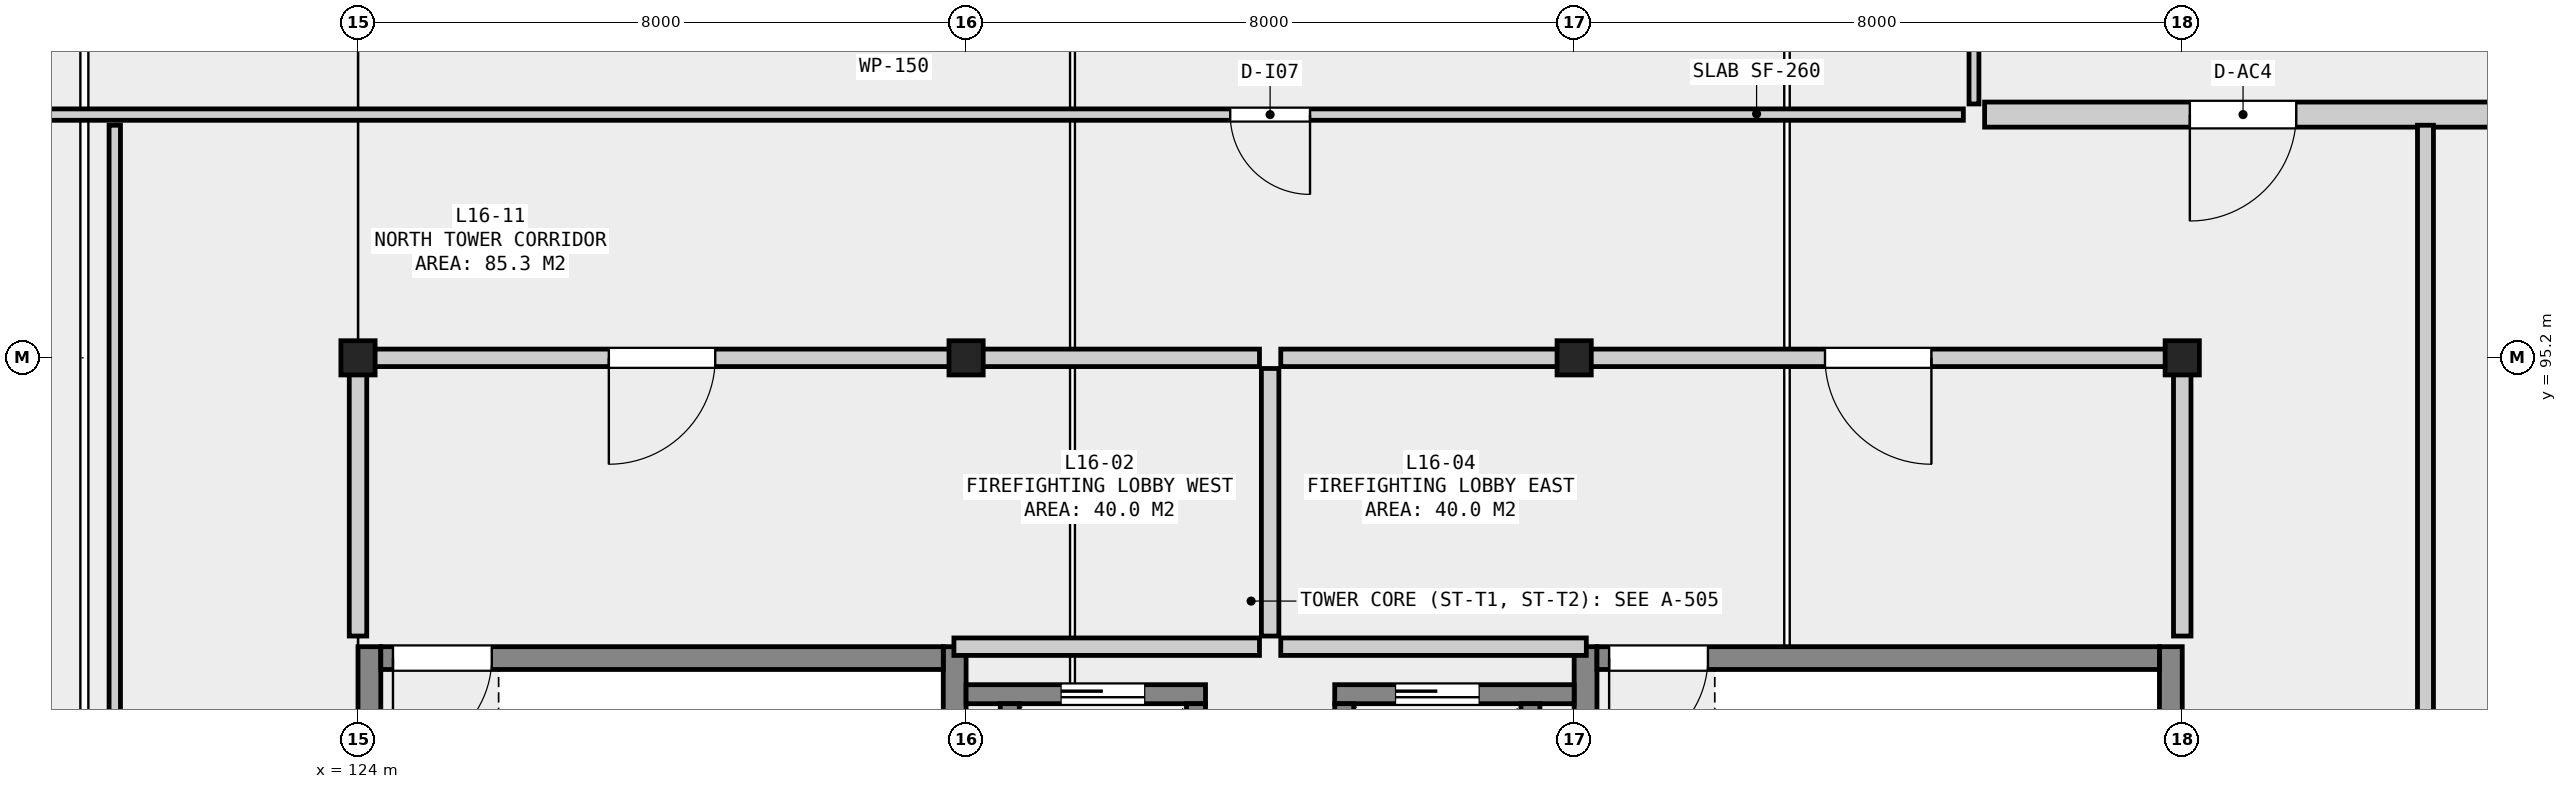
"""IFC4 building model, lengths in metres.
Left out: names, types, materials, properties, quantities, classifications, styles, units other than length and angle.
Written with IfcOpenShell. Run it as: python <this file> out.ifc"""

import sys

from ifc_helpers import new_model, si_unit, direction, frame, frame_2d, origin, origin_2d, place, context, subcontext, project, spatial, rectangle, extrude, element, fill, save


model = new_model("IFC4")
c1 = context("Model", 3, precision=1e-05, world=origin(), true_north=direction((0.0, 1.0)))
c2 = subcontext(c1, "Body", "Model", "MODEL_VIEW")
j1 = project(units=[si_unit("LENGTHUNIT", "METRE"), si_unit("PLANEANGLEUNIT", "RADIAN")], contexts=[c1])
p1 = place(None, origin())
s1 = spatial("IfcSite", under=j1, at=p1, CompositionType="ELEMENT")
p2 = place(p1, origin())
s2 = spatial("IfcBuilding", under=s1, at=p2, CompositionType="ELEMENT")
p3 = place(p2, frame((0.0, 0.0, 66.6)))
s3 = spatial("IfcBuildingStorey", under=s2, at=p3, CompositionType="ELEMENT", Elevation=66.6)
for number, where, z_axis, x_axis in (
    (1, (124.0, 95.2, 0.0), (0.0, 0.0, 1.0), (1.0, 0.0, 0.0)),
    (2, (132.0, 95.2, 0.0), (0.0, 0.0, 1.0), (1.0, 0.0, 0.0)),
    (3, (140.0, 95.2, 0.0), (0.0, 0.0, 1.0), (1.0, 0.0, 0.0)),
    (4, (148.0, 95.2, 0.0), (0.0, 0.0, 1.0), (1.0, 0.0, 0.0)),
):
    element("IfcColumn", number, at=place(p3, frame(where, z_axis=z_axis, x_axis=x_axis)), inside=s3, PredefinedType="COLUMN", context=c2, shape_type="SweptSolid", body=[
        extrude(rectangle(XDim=0.45, YDim=0.45, at=origin_2d()), origin(), (0.0, 0.0, 1.0), 4.5),
    ])
for number, where, z_axis, x_axis in (
    (5, (124.15, 87.2, 0.0), (0.0, 0.0, 1.0), (0.0, 1.0, 0.0)),
    (6, (131.85, 87.2, 0.0), (0.0, 0.0, 1.0), (0.0, 1.0, 0.0)),
):
    element("IfcWall", number, at=place(p3, frame(where, z_axis=z_axis, x_axis=x_axis)), inside=s3, PredefinedType="SHEAR", context=c2, shape_type="SweptSolid", body=[
        extrude(rectangle(XDim=4.2, YDim=0.3, at=frame_2d((2.1, 0.0))), origin(), (0.0, 0.0, 1.0), 3.55),
    ])
p4 = place(p3, frame((124.3, 91.25, 0.0), z_axis=(0.0, 0.0, 1.0), x_axis=(1.0, 0.0, 0.0)))
e7 = element("IfcWall", 7, at=p4, inside=s3, PredefinedType="SHEAR", context=c2, shape_type="SweptSolid", body=[
    extrude(rectangle(XDim=7.4, YDim=0.3, at=frame_2d((3.7, 0.0))), origin(), (0.0, 0.0, 1.0), 3.55),
])
p5 = place(p4, frame((0.16, 0.0, 0.0)))
e8 = element("IfcOpeningElement", 8, at=p5, cuts=e7, PredefinedType="OPENING", context=c2, shape_type="SweptSolid", body=[
    extrude(rectangle(XDim=1.3, YDim=2.18, at=frame_2d((0.65, 1.09))), frame((0.0, 0.162, 0.0), z_axis=(0.0, -1.0, 0.0), x_axis=(1.0, 0.0, 0.0)), (0.0, 0.0, 1.0), 0.324),
])
for number, where, z_axis, x_axis in (
    (9, (140.15, 87.2, 0.0), (0.0, 0.0, 1.0), (0.0, 1.0, 0.0)),
    (10, (147.85, 87.2, 0.0), (0.0, 0.0, 1.0), (0.0, 1.0, 0.0)),
):
    element("IfcWall", number, at=place(p3, frame(where, z_axis=z_axis, x_axis=x_axis)), inside=s3, PredefinedType="SHEAR", context=c2, shape_type="SweptSolid", body=[
        extrude(rectangle(XDim=4.2, YDim=0.3, at=frame_2d((2.1, 0.0))), origin(), (0.0, 0.0, 1.0), 3.55),
    ])
p6 = place(p3, frame((140.3, 91.25, 0.0), z_axis=(0.0, 0.0, 1.0), x_axis=(1.0, 0.0, 0.0)))
e11 = element("IfcWall", 11, at=p6, inside=s3, PredefinedType="SHEAR", context=c2, shape_type="SweptSolid", body=[
    extrude(rectangle(XDim=7.4, YDim=0.3, at=frame_2d((3.7, 0.0))), origin(), (0.0, 0.0, 1.0), 3.55),
])
p7 = place(p6, frame((0.16, 0.0, 0.0)))
e12 = element("IfcOpeningElement", 12, at=p7, cuts=e11, PredefinedType="OPENING", context=c2, shape_type="SweptSolid", body=[
    extrude(rectangle(XDim=1.3, YDim=2.18, at=frame_2d((0.65, 1.09))), frame((0.0, 0.162, 0.0), z_axis=(0.0, -1.0, 0.0), x_axis=(1.0, 0.0, 0.0)), (0.0, 0.0, 1.0), 0.324),
])
p8 = place(p3, frame((132.0, 90.775, 0.0), z_axis=(0.0, 0.0, 1.0), x_axis=(1.0, 0.0, 0.0)))
e13 = element("IfcWall", 13, at=p8, inside=s3, PredefinedType="SHEAR", context=c2, shape_type="SweptSolid", body=[
    extrude(rectangle(XDim=3.15, YDim=0.25, at=frame_2d((1.575, 0.0))), origin(), (0.0, 0.0, 1.0), 3.55),
])
p9 = place(p8, frame((1.25, 0.0, 0.0)))
e14 = element("IfcOpeningElement", 14, at=p9, cuts=e13, PredefinedType="OPENING", context=c2, shape_type="SweptSolid", body=[
    extrude(rectangle(XDim=1.1, YDim=2.15, at=frame_2d((0.55, 1.075))), frame((0.0, 0.137, 0.0), z_axis=(0.0, -1.0, 0.0), x_axis=(1.0, 0.0, 0.0)), (0.0, 0.0, 1.0), 0.274),
])
for number, where, z_axis, x_axis in (
    (15, (132.575, 87.75, 0.0), (0.0, 0.0, 1.0), (0.0, 1.0, 0.0)),
    (16, (135.025, 87.75, 0.0), (0.0, 0.0, 1.0), (0.0, 1.0, 0.0)),
):
    element("IfcWall", number, at=place(p3, frame(where, z_axis=z_axis, x_axis=x_axis)), inside=s3, PredefinedType="SHEAR", context=c2, shape_type="SweptSolid", body=[
        extrude(rectangle(XDim=2.9, YDim=0.25, at=frame_2d((1.45, 0.0))), origin(), (0.0, 0.0, 1.0), 3.55),
    ])
p10 = place(p3, frame((136.85, 90.775, 0.0), z_axis=(0.0, 0.0, 1.0), x_axis=(1.0, 0.0, 0.0)))
e17 = element("IfcWall", 17, at=p10, inside=s3, PredefinedType="SHEAR", context=c2, shape_type="SweptSolid", body=[
    extrude(rectangle(XDim=3.15, YDim=0.25, at=frame_2d((1.575, 0.0))), origin(), (0.0, 0.0, 1.0), 3.55),
])
p11 = place(p10, frame((0.8, 0.0, 0.0)))
e18 = element("IfcOpeningElement", 18, at=p11, cuts=e17, PredefinedType="OPENING", context=c2, shape_type="SweptSolid", body=[
    extrude(rectangle(XDim=1.1, YDim=2.15, at=frame_2d((0.55, 1.075))), frame((0.0, 0.137, 0.0), z_axis=(0.0, -1.0, 0.0), x_axis=(1.0, 0.0, 0.0)), (0.0, 0.0, 1.0), 0.274),
])
for number, where, z_axis, x_axis in (
    (19, (136.975, 87.75, 0.0), (0.0, 0.0, 1.0), (0.0, 1.0, 0.0)),
    (20, (139.425, 87.75, 0.0), (0.0, 0.0, 1.0), (0.0, 1.0, 0.0)),
):
    element("IfcWall", number, at=place(p3, frame(where, z_axis=z_axis, x_axis=x_axis)), inside=s3, PredefinedType="SHEAR", context=c2, shape_type="SweptSolid", body=[
        extrude(rectangle(XDim=2.9, YDim=0.25, at=frame_2d((1.45, 0.0))), origin(), (0.0, 0.0, 1.0), 3.55),
    ])
p12 = place(p3, frame((131.84, 91.4, 0.0), z_axis=(0.0, 0.0, 1.0), x_axis=(1.0, 0.0, 0.0)))
e21 = element("IfcWall", 21, at=p12, inside=s3, PredefinedType="SOLIDWALL", context=c2, shape_type="SweptSolid", body=[
    extrude(rectangle(XDim=4.02, YDim=0.23, at=frame_2d((2.01, 0.0))), origin(), (0.0, 0.0, 1.0), 3.55),
])
p13 = place(p3, frame((124.14, 95.2, 0.0), z_axis=(0.0, 0.0, 1.0), x_axis=(1.0, 0.0, 0.0)))
e22 = element("IfcWall", 22, at=p13, inside=s3, PredefinedType="SOLIDWALL", context=c2, shape_type="SweptSolid", body=[
    extrude(rectangle(XDim=11.72, YDim=0.23, at=frame_2d((5.86, 0.0))), origin(), (0.0, 0.0, 1.0), 3.55),
])
p14 = place(p13, frame((3.16, 0.0, 0.0)))
e23 = element("IfcOpeningElement", 23, at=p14, cuts=e22, PredefinedType="OPENING", context=c2, shape_type="SweptSolid", body=[
    extrude(rectangle(XDim=1.4, YDim=2.2, at=frame_2d((0.7, 1.1))), frame((0.0, 0.127, 0.0), z_axis=(0.0, -1.0, 0.0), x_axis=(1.0, 0.0, 0.0)), (0.0, 0.0, 1.0), 0.254),
])
for number, where, z_axis, x_axis in (
    (24, (124.0, 91.54, 0.0), (0.0, 0.0, 1.0), (0.0, 1.0, 0.0)),
    (25, (136.0, 91.54, 0.0), (0.0, 0.0, 1.0), (0.0, 1.0, 0.0)),
):
    element("IfcWall", number, at=place(p3, frame(where, z_axis=z_axis, x_axis=x_axis)), inside=s3, PredefinedType="SOLIDWALL", context=c2, shape_type="SweptSolid", body=[
        extrude(rectangle(XDim=3.52, YDim=0.23, at=frame_2d((1.76, 0.0))), origin(), (0.0, 0.0, 1.0), 3.55),
    ])
p15 = place(p3, frame((136.14, 91.4, 0.0), z_axis=(0.0, 0.0, 1.0), x_axis=(1.0, 0.0, 0.0)))
e26 = element("IfcWall", 26, at=p15, inside=s3, PredefinedType="SOLIDWALL", context=c2, shape_type="SweptSolid", body=[
    extrude(rectangle(XDim=4.02, YDim=0.23, at=frame_2d((2.01, 0.0))), origin(), (0.0, 0.0, 1.0), 3.55),
])
p16 = place(p3, frame((136.14, 95.2, 0.0), z_axis=(0.0, 0.0, 1.0), x_axis=(1.0, 0.0, 0.0)))
e27 = element("IfcWall", 27, at=p16, inside=s3, PredefinedType="SOLIDWALL", context=c2, shape_type="SweptSolid", body=[
    extrude(rectangle(XDim=11.72, YDim=0.23, at=frame_2d((5.86, 0.0))), origin(), (0.0, 0.0, 1.0), 3.55),
])
p17 = place(p16, frame((7.16, 0.0, 0.0)))
e28 = element("IfcOpeningElement", 28, at=p17, cuts=e27, PredefinedType="OPENING", context=c2, shape_type="SweptSolid", body=[
    extrude(rectangle(XDim=1.4, YDim=2.2, at=frame_2d((0.7, 1.1))), frame((0.0, 0.127, 0.0), z_axis=(0.0, -1.0, 0.0), x_axis=(1.0, 0.0, 0.0)), (0.0, 0.0, 1.0), 0.254),
])
p18 = place(p3, frame((148.0, 91.54, 0.0), z_axis=(0.0, 0.0, 1.0), x_axis=(0.0, 1.0, 0.0)))
e29 = element("IfcWall", 29, at=p18, inside=s3, PredefinedType="SOLIDWALL", context=c2, shape_type="SweptSolid", body=[
    extrude(rectangle(XDim=3.52, YDim=0.23, at=frame_2d((1.76, 0.0))), origin(), (0.0, 0.0, 1.0), 3.55),
])
p19 = place(p3, frame((116.985, 98.4, 0.0), z_axis=(0.0, 0.0, 1.0), x_axis=(1.0, 0.0, 0.0)))
e30 = element("IfcWall", 30, at=p19, inside=s3, PredefinedType="PARTITIONING", context=c2, shape_type="SweptSolid", body=[
    extrude(rectangle(XDim=28.135, YDim=0.15, at=frame_2d((14.067, 0.0))), origin(), (0.0, 0.0, 1.0), 3.55),
])
p20 = place(p19, frame((18.49, 0.0, 0.0)))
e31 = element("IfcOpeningElement", 31, at=p20, cuts=e30, PredefinedType="OPENING", context=c2, shape_type="SweptSolid", body=[
    extrude(rectangle(XDim=1.05, YDim=2.15, at=frame_2d((0.525, 1.075))), frame((0.0, 0.087, 0.0), z_axis=(0.0, -1.0, 0.0), x_axis=(1.0, 0.0, 0.0)), (0.0, 0.0, 1.0), 0.174),
])
p21 = place(p3, frame((145.26, 98.54, 0.0), z_axis=(0.0, 0.0, 1.0), x_axis=(0.0, 1.0, 0.0)))
e32 = element("IfcWall", 32, at=p21, inside=s3, PredefinedType="PARTITIONING", context=c2, shape_type="SweptSolid", body=[
    extrude(rectangle(XDim=10.17, YDim=0.13, at=frame_2d((5.085, 0.0))), origin(), (0.0, 0.0, 1.0), 3.55),
])
p22 = place(p3, frame((145.4, 98.4, 0.0), z_axis=(0.0, 0.0, 1.0), x_axis=(1.0, 0.0, 0.0)))
e33 = element("IfcWall", 33, at=p22, inside=s3, PredefinedType="SOLIDWALL", context=c2, shape_type="SweptSolid", body=[
    extrude(rectangle(XDim=22.51, YDim=0.33, at=frame_2d((11.255, 0.0))), origin(), (0.0, 0.0, 1.0), 3.55),
])
p23 = place(p22, frame((2.7, 0.0, 0.0)))
e34 = element("IfcOpeningElement", 34, at=p23, cuts=e33, PredefinedType="OPENING", context=c2, shape_type="SweptSolid", body=[
    extrude(rectangle(XDim=1.4, YDim=2.2, at=frame_2d((0.7, 1.1))), frame((0.0, 0.177, 0.0), z_axis=(0.0, -1.0, 0.0), x_axis=(1.0, 0.0, 0.0)), (0.0, 0.0, 1.0), 0.354),
])
p24 = place(p3, frame((151.2, 72.175, 0.0), z_axis=(0.0, 0.0, 1.0), x_axis=(0.0, 1.0, 0.0)))
e35 = element("IfcWall", 35, at=p24, inside=s3, PredefinedType="SOLIDWALL", context=c2, shape_type="SweptSolid", body=[
    extrude(rectangle(XDim=26.085, YDim=0.21, at=frame_2d((13.042, 0.0))), origin(), (0.0, 0.0, 1.0), 3.55),
])
p25 = place(p24, frame((14.325, 0.0, 0.0)))
e36 = element("IfcOpeningElement", 36, at=p25, cuts=e35, PredefinedType="OPENING", context=c2, shape_type="SweptSolid", body=[
    extrude(rectangle(XDim=1.4, YDim=2.2, at=frame_2d((0.7, 1.1))), frame((0.0, 0.117, 0.0), z_axis=(0.0, -1.0, 0.0), x_axis=(1.0, 0.0, 0.0)), (0.0, 0.0, 1.0), 0.234),
])
p26 = place(p3, frame((120.8, 76.14, 0.0), z_axis=(0.0, 0.0, 1.0), x_axis=(0.0, 1.0, 0.0)))
e37 = element("IfcWall", 37, at=p26, inside=s3, PredefinedType="PARTITIONING", context=c2, shape_type="SweptSolid", body=[
    extrude(rectangle(XDim=22.12, YDim=0.15, at=frame_2d((11.06, 0.0))), origin(), (0.0, 0.0, 1.0), 3.55),
])
p27 = place(p26, frame((10.535, 0.0, 0.0)))
e38 = element("IfcOpeningElement", 38, at=p27, cuts=e37, PredefinedType="OPENING", context=c2, shape_type="SweptSolid", body=[
    extrude(rectangle(XDim=1.05, YDim=2.15, at=frame_2d((0.525, 1.075))), frame((0.0, 0.087, 0.0), z_axis=(0.0, -1.0, 0.0), x_axis=(1.0, 0.0, 0.0)), (0.0, 0.0, 1.0), 0.174),
])
p28 = place(p5, frame((1.3, 0.0, 0.0), z_axis=(0.0, 0.0, 1.0), x_axis=(-1.0, 0.0, 0.0)))
e39 = element("IfcDoor", 39, at=p28, inside=s3, OperationType="SINGLE_SWING_RIGHT", PredefinedType="DOOR", context=c2, shape_type="SweptSolid", body=[
    extrude(rectangle(XDim=1.3, YDim=2.18, at=frame_2d((0.65, 1.09))), frame((0.0, 0.025, 0.0), z_axis=(0.0, -1.0, 0.0), x_axis=(1.0, 0.0, 0.0)), (0.0, 0.0, 1.0), 0.05),
])
fill(e8, e39)
p29 = place(p7, frame((1.3, 0.0, 0.0), z_axis=(0.0, 0.0, 1.0), x_axis=(-1.0, 0.0, 0.0)))
e40 = element("IfcDoor", 40, at=p29, inside=s3, OperationType="SINGLE_SWING_RIGHT", PredefinedType="DOOR", context=c2, shape_type="SweptSolid", body=[
    extrude(rectangle(XDim=1.3, YDim=2.18, at=frame_2d((0.65, 1.09))), frame((0.0, 0.025, 0.0), z_axis=(0.0, -1.0, 0.0), x_axis=(1.0, 0.0, 0.0)), (0.0, 0.0, 1.0), 0.05),
])
fill(e12, e40)
p30 = place(p9, origin())
e41 = element("IfcDoor", 41, at=p30, inside=s3, OperationType="SLIDING_TO_LEFT", PredefinedType="DOOR", context=c2, shape_type="SweptSolid", body=[
    extrude(rectangle(XDim=1.1, YDim=2.15, at=frame_2d((0.55, 1.075))), frame((0.0, 0.025, 0.0), z_axis=(0.0, -1.0, 0.0), x_axis=(1.0, 0.0, 0.0)), (0.0, 0.0, 1.0), 0.05),
])
fill(e14, e41)
p31 = place(p11, origin())
e42 = element("IfcDoor", 42, at=p31, inside=s3, OperationType="SLIDING_TO_LEFT", PredefinedType="DOOR", context=c2, shape_type="SweptSolid", body=[
    extrude(rectangle(XDim=1.1, YDim=2.15, at=frame_2d((0.55, 1.075))), frame((0.0, 0.025, 0.0), z_axis=(0.0, -1.0, 0.0), x_axis=(1.0, 0.0, 0.0)), (0.0, 0.0, 1.0), 0.05),
])
fill(e18, e42)
p32 = place(p14, frame((1.4, 0.0, 0.0), z_axis=(0.0, 0.0, 1.0), x_axis=(-1.0, 0.0, 0.0)))
e43 = element("IfcDoor", 43, at=p32, inside=s3, OperationType="SINGLE_SWING_RIGHT", PredefinedType="DOOR", context=c2, shape_type="SweptSolid", body=[
    extrude(rectangle(XDim=1.4, YDim=2.2, at=frame_2d((0.7, 1.1))), frame((0.0, 0.025, 0.0), z_axis=(0.0, -1.0, 0.0), x_axis=(1.0, 0.0, 0.0)), (0.0, 0.0, 1.0), 0.05),
])
fill(e23, e43)
p33 = place(p17, frame((1.4, 0.0, 0.0), z_axis=(0.0, 0.0, 1.0), x_axis=(-1.0, 0.0, 0.0)))
e44 = element("IfcDoor", 44, at=p33, inside=s3, OperationType="SINGLE_SWING_LEFT", PredefinedType="DOOR", context=c2, shape_type="SweptSolid", body=[
    extrude(rectangle(XDim=1.4, YDim=2.2, at=frame_2d((0.7, 1.1))), frame((0.0, 0.025, 0.0), z_axis=(0.0, -1.0, 0.0), x_axis=(1.0, 0.0, 0.0)), (0.0, 0.0, 1.0), 0.05),
])
fill(e28, e44)
p34 = place(p20, frame((1.05, 0.0, 0.0), z_axis=(0.0, 0.0, 1.0), x_axis=(-1.0, 0.0, 0.0)))
e45 = element("IfcDoor", 45, at=p34, inside=s3, OperationType="SINGLE_SWING_LEFT", PredefinedType="DOOR", context=c2, shape_type="SweptSolid", body=[
    extrude(rectangle(XDim=1.05, YDim=2.15, at=frame_2d((0.525, 1.075))), frame((0.0, 0.025, 0.0), z_axis=(0.0, -1.0, 0.0), x_axis=(1.0, 0.0, 0.0)), (0.0, 0.0, 1.0), 0.05),
])
fill(e31, e45)
p35 = place(p23, frame((1.4, 0.0, 0.0), z_axis=(0.0, 0.0, 1.0), x_axis=(-1.0, 0.0, 0.0)))
e46 = element("IfcDoor", 46, at=p35, inside=s3, OperationType="SINGLE_SWING_RIGHT", PredefinedType="DOOR", context=c2, shape_type="SweptSolid", body=[
    extrude(rectangle(XDim=1.4, YDim=2.2, at=frame_2d((0.7, 1.1))), frame((0.0, 0.025, 0.0), z_axis=(0.0, -1.0, 0.0), x_axis=(1.0, 0.0, 0.0)), (0.0, 0.0, 1.0), 0.05),
])
fill(e34, e46)
save(model, sys.argv[1])
